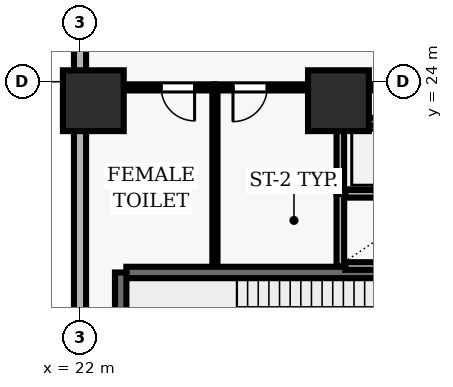
"""IFC4 building model, lengths in metres.
Left out: names, types, materials, properties, quantities, classifications, styles, units other than length and angle.
Written with IfcOpenShell. Run it as: python <this file> out.ifc"""

import sys

from ifc_helpers import new_model, si_unit, direction, frame, frame_2d, origin, origin_2d, place, context, subcontext, project, spatial, rectangle, extrude, element, fill, save


model = new_model("IFC4")
c1 = context("Model", 3, precision=1e-05, world=origin(), true_north=direction((0.0, 1.0)))
c2 = subcontext(c1, "Body", "Model", "MODEL_VIEW")
j1 = project(units=[si_unit("LENGTHUNIT", "METRE"), si_unit("PLANEANGLEUNIT", "RADIAN")], contexts=[c1])
p1 = place(None, origin())
s1 = spatial("IfcSite", under=j1, at=p1, CompositionType="ELEMENT")
p2 = place(p1, origin())
s2 = spatial("IfcBuilding", under=s1, at=p2, CompositionType="ELEMENT")
p3 = place(p2, frame((0.0, 0.0, 10.4)))
s3 = spatial("IfcBuildingStorey", under=s2, at=p3, CompositionType="ELEMENT", Elevation=10.4)
for number, where, z_axis, x_axis in (
    (1, (22.35, 23.5, 0.0), (0.0, 0.0, 1.0), (1.0, 0.0, 0.0)),
    (2, (28.8, 23.5, 0.0), (0.0, 0.0, 1.0), (1.0, 0.0, 0.0)),
):
    element("IfcColumn", number, at=place(p3, frame(where, z_axis=z_axis, x_axis=x_axis)), inside=s3, PredefinedType="COLUMN", context=c2, shape_type="SweptSolid", body=[
        extrude(rectangle(XDim=1.6, YDim=1.6, at=origin_2d()), origin(), (0.0, 0.0, 1.0), 5.2),
    ])
p4 = place(p3, frame((22.0, 51.5, 0.0), z_axis=(0.0, 0.0, 1.0), x_axis=(0.0, -1.0, 0.0)))
e3 = element("IfcWall", 3, at=p4, inside=s3, PredefinedType="SOLIDWALL", context=c2, shape_type="SweptSolid", body=[
    extrude(rectangle(XDim=49.0, YDim=0.32, at=frame_2d((24.5, 0.0))), origin(), (0.0, 0.0, 1.0), 4.92),
])
p5 = place(p4, frame((0.772, 0.0, 0.9)))
e4 = element("IfcOpeningElement", 4, at=p5, cuts=e3, PredefinedType="OPENING", context=c2, shape_type="SweptSolid", body=[
    extrude(rectangle(XDim=3.0, YDim=2.2, at=frame_2d((1.5, 1.1))), frame((0.0, 0.17, 0.0), z_axis=(0.0, -1.0, 0.0), x_axis=(1.0, 0.0, 0.0)), (0.0, 0.0, 1.0), 0.34),
])
p6 = place(p4, frame((6.667, 0.0, 0.9)))
e5 = element("IfcOpeningElement", 5, at=p6, cuts=e3, PredefinedType="OPENING", context=c2, shape_type="SweptSolid", body=[
    extrude(rectangle(XDim=3.0, YDim=2.2, at=frame_2d((1.5, 1.1))), frame((0.0, 0.17, 0.0), z_axis=(0.0, -1.0, 0.0), x_axis=(1.0, 0.0, 0.0)), (0.0, 0.0, 1.0), 0.34),
])
p7 = place(p4, frame((11.661, 0.0, 0.9)))
e6 = element("IfcOpeningElement", 6, at=p7, cuts=e3, PredefinedType="OPENING", context=c2, shape_type="SweptSolid", body=[
    extrude(rectangle(XDim=3.0, YDim=2.2, at=frame_2d((1.5, 1.1))), frame((0.0, 0.17, 0.0), z_axis=(0.0, -1.0, 0.0), x_axis=(1.0, 0.0, 0.0)), (0.0, 0.0, 1.0), 0.34),
])
p8 = place(p4, frame((17.556, 0.0, 0.9)))
e7 = element("IfcOpeningElement", 7, at=p8, cuts=e3, PredefinedType="OPENING", context=c2, shape_type="SweptSolid", body=[
    extrude(rectangle(XDim=3.0, YDim=2.2, at=frame_2d((1.5, 1.1))), frame((0.0, 0.17, 0.0), z_axis=(0.0, -1.0, 0.0), x_axis=(1.0, 0.0, 0.0)), (0.0, 0.0, 1.0), 0.34),
])
p9 = place(p4, frame((39.333, 0.0, 0.9)))
e8 = element("IfcOpeningElement", 8, at=p9, cuts=e3, PredefinedType="OPENING", context=c2, shape_type="SweptSolid", body=[
    extrude(rectangle(XDim=3.0, YDim=2.2, at=frame_2d((1.5, 1.1))), frame((0.0, 0.17, 0.0), z_axis=(0.0, -1.0, 0.0), x_axis=(1.0, 0.0, 0.0)), (0.0, 0.0, 1.0), 0.34),
])
p10 = place(p3, frame((31.58, 18.98, 0.0), z_axis=(0.0, 0.0, 1.0), x_axis=(-1.0, 0.0, 0.0)))
e9 = element("IfcWall", 9, at=p10, inside=s3, PredefinedType="SHEAR", context=c2, shape_type="SweptSolid", body=[
    extrude(rectangle(XDim=8.36, YDim=0.3, at=frame_2d((4.18, 0.0))), origin(), (0.0, 0.0, 1.0), 4.92),
])
p11 = place(p3, frame((23.07, 18.98, 0.0), z_axis=(0.0, 0.0, 1.0), x_axis=(0.0, -1.0, 0.0)))
e10 = element("IfcWall", 10, at=p11, inside=s3, PredefinedType="SHEAR", context=c2, shape_type="SweptSolid", body=[
    extrude(rectangle(XDim=3.51, YDim=0.3, at=frame_2d((1.755, 0.0))), origin(), (0.0, 0.0, 1.0), 4.92),
])
p12 = place(p3, frame((28.85, 21.05, 0.0), z_axis=(0.0, 0.0, 1.0), x_axis=(0.0, -1.0, 0.0)))
e11 = element("IfcWall", 11, at=p12, inside=s3, PredefinedType="SOLIDWALL", context=c2, shape_type="SweptSolid", body=[
    extrude(rectangle(XDim=1.9, YDim=0.2, at=frame_2d((0.95, 0.0))), origin(), (0.0, 0.0, 1.0), 4.92),
])
for number, where, z_axis, x_axis in (
    (12, (28.98, 19.15, 0.0), (0.0, 0.0, 1.0), (1.0, 0.0, 0.0)),
    (13, (31.42, 21.05, 0.0), (0.0, 0.0, 1.0), (-1.0, 0.0, 0.0)),
):
    element("IfcWall", number, at=place(p3, frame(where, z_axis=z_axis, x_axis=x_axis)), inside=s3, PredefinedType="SOLIDWALL", context=c2, shape_type="SweptSolid", body=[
        extrude(rectangle(XDim=2.44, YDim=0.2, at=frame_2d((1.22, 0.0))), origin(), (0.0, 0.0, 1.0), 4.92),
    ])
p13 = place(p3, frame((28.85, 22.95, 0.0), z_axis=(0.0, 0.0, 1.0), x_axis=(0.0, -1.0, 0.0)))
e14 = element("IfcWall", 14, at=p13, inside=s3, PredefinedType="SOLIDWALL", context=c2, shape_type="SweptSolid", body=[
    extrude(rectangle(XDim=1.9, YDim=0.2, at=frame_2d((0.95, 0.0))), origin(), (0.0, 0.0, 1.0), 4.92),
])
p14 = place(p3, frame((31.43, 22.95, 0.0), z_axis=(0.0, 0.0, 1.0), x_axis=(-1.0, 0.0, 0.0)))
e15 = element("IfcWall", 15, at=p14, inside=s3, PredefinedType="SOLIDWALL", context=c2, shape_type="SweptSolid", body=[
    extrude(rectangle(XDim=2.46, YDim=0.2, at=frame_2d((1.23, 0.0))), origin(), (0.0, 0.0, 1.0), 4.92),
])
p15 = place(p3, frame((25.55, 23.85, 0.0), z_axis=(0.0, 0.0, 1.0), x_axis=(-1.0, 0.0, 0.0)))
e16 = element("IfcWall", 16, at=p15, inside=s3, PredefinedType="PARTITIONING", context=c2, shape_type="SweptSolid", body=[
    extrude(rectangle(XDim=3.35, YDim=0.16, at=frame_2d((1.675, 0.0))), origin(), (0.0, 0.0, 1.0), 4.065),
])
p16 = place(p15, frame((0.535, 0.0, 0.0)))
e17 = element("IfcOpeningElement", 17, at=p16, cuts=e16, PredefinedType="OPENING", context=c2, shape_type="SweptSolid", body=[
    extrude(rectangle(XDim=0.88, YDim=2.1, at=frame_2d((0.44, 1.05))), frame((0.0, 0.09, 0.0), z_axis=(0.0, -1.0, 0.0), x_axis=(1.0, 0.0, 0.0)), (0.0, 0.0, 1.0), 0.18),
])
p17 = place(p3, frame((28.8, 23.85, 0.0), z_axis=(0.0, 0.0, 1.0), x_axis=(-1.0, 0.0, 0.0)))
e18 = element("IfcWall", 18, at=p17, inside=s3, PredefinedType="PARTITIONING", context=c2, shape_type="SweptSolid", body=[
    extrude(rectangle(XDim=3.25, YDim=0.16, at=frame_2d((1.625, 0.0))), origin(), (0.0, 0.0, 1.0), 4.065),
])
p18 = place(p17, frame((1.875, 0.0, 0.0)))
e19 = element("IfcOpeningElement", 19, at=p18, cuts=e18, PredefinedType="OPENING", context=c2, shape_type="SweptSolid", body=[
    extrude(rectangle(XDim=0.9, YDim=2.1, at=frame_2d((0.45, 1.05))), frame((0.0, 0.09, 0.0), z_axis=(0.0, -1.0, 0.0), x_axis=(1.0, 0.0, 0.0)), (0.0, 0.0, 1.0), 0.18),
])
p19 = place(p3, frame((28.8, 23.85, 0.0), z_axis=(0.0, 0.0, 1.0), x_axis=(1.0, 0.0, 0.0)))
e20 = element("IfcWall", 20, at=p19, inside=s3, PredefinedType="PARTITIONING", context=c2, shape_type="SweptSolid", body=[
    extrude(rectangle(XDim=2.85, YDim=0.16, at=frame_2d((1.425, 0.0))), origin(), (0.0, 0.0, 1.0), 4.92),
])
p20 = place(p3, frame((25.55, 19.16, 0.0), z_axis=(0.0, 0.0, 1.0), x_axis=(0.0, 1.0, 0.0)))
e21 = element("IfcWall", 21, at=p20, inside=s3, PredefinedType="PARTITIONING", context=c2, shape_type="SweptSolid", body=[
    extrude(rectangle(XDim=4.615, YDim=0.135, at=frame_2d((2.308, 0.0))), origin(), (0.0, 0.0, 1.0), 4.92),
])
p21 = place(p3, frame((28.8, 22.95, 0.0), z_axis=(0.0, 0.0, 1.0), x_axis=(0.0, 1.0, 0.0)))
e22 = element("IfcWall", 22, at=p21, inside=s3, PredefinedType="PARTITIONING", context=c2, shape_type="SweptSolid", body=[
    extrude(rectangle(XDim=0.825, YDim=0.125, at=frame_2d((0.413, 0.0))), origin(), (0.0, 0.0, 1.0), 4.92),
])
p22 = place(p16, origin())
e23 = element("IfcDoor", 23, at=p22, inside=s3, OperationType="SINGLE_SWING_LEFT", PredefinedType="DOOR", context=c2, shape_type="SweptSolid", body=[
    extrude(rectangle(XDim=0.88, YDim=2.1, at=frame_2d((0.44, 1.05))), frame((0.0, 0.025, 0.0), z_axis=(0.0, -1.0, 0.0), x_axis=(1.0, 0.0, 0.0)), (0.0, 0.0, 1.0), 0.05),
])
fill(e17, e23)
p23 = place(p18, origin())
e24 = element("IfcDoor", 24, at=p23, inside=s3, OperationType="SINGLE_SWING_RIGHT", PredefinedType="DOOR", context=c2, shape_type="SweptSolid", body=[
    extrude(rectangle(XDim=0.9, YDim=2.1, at=frame_2d((0.45, 1.05))), frame((0.0, 0.025, 0.0), z_axis=(0.0, -1.0, 0.0), x_axis=(1.0, 0.0, 0.0)), (0.0, 0.0, 1.0), 0.05),
])
fill(e19, e24)
save(model, sys.argv[1])
